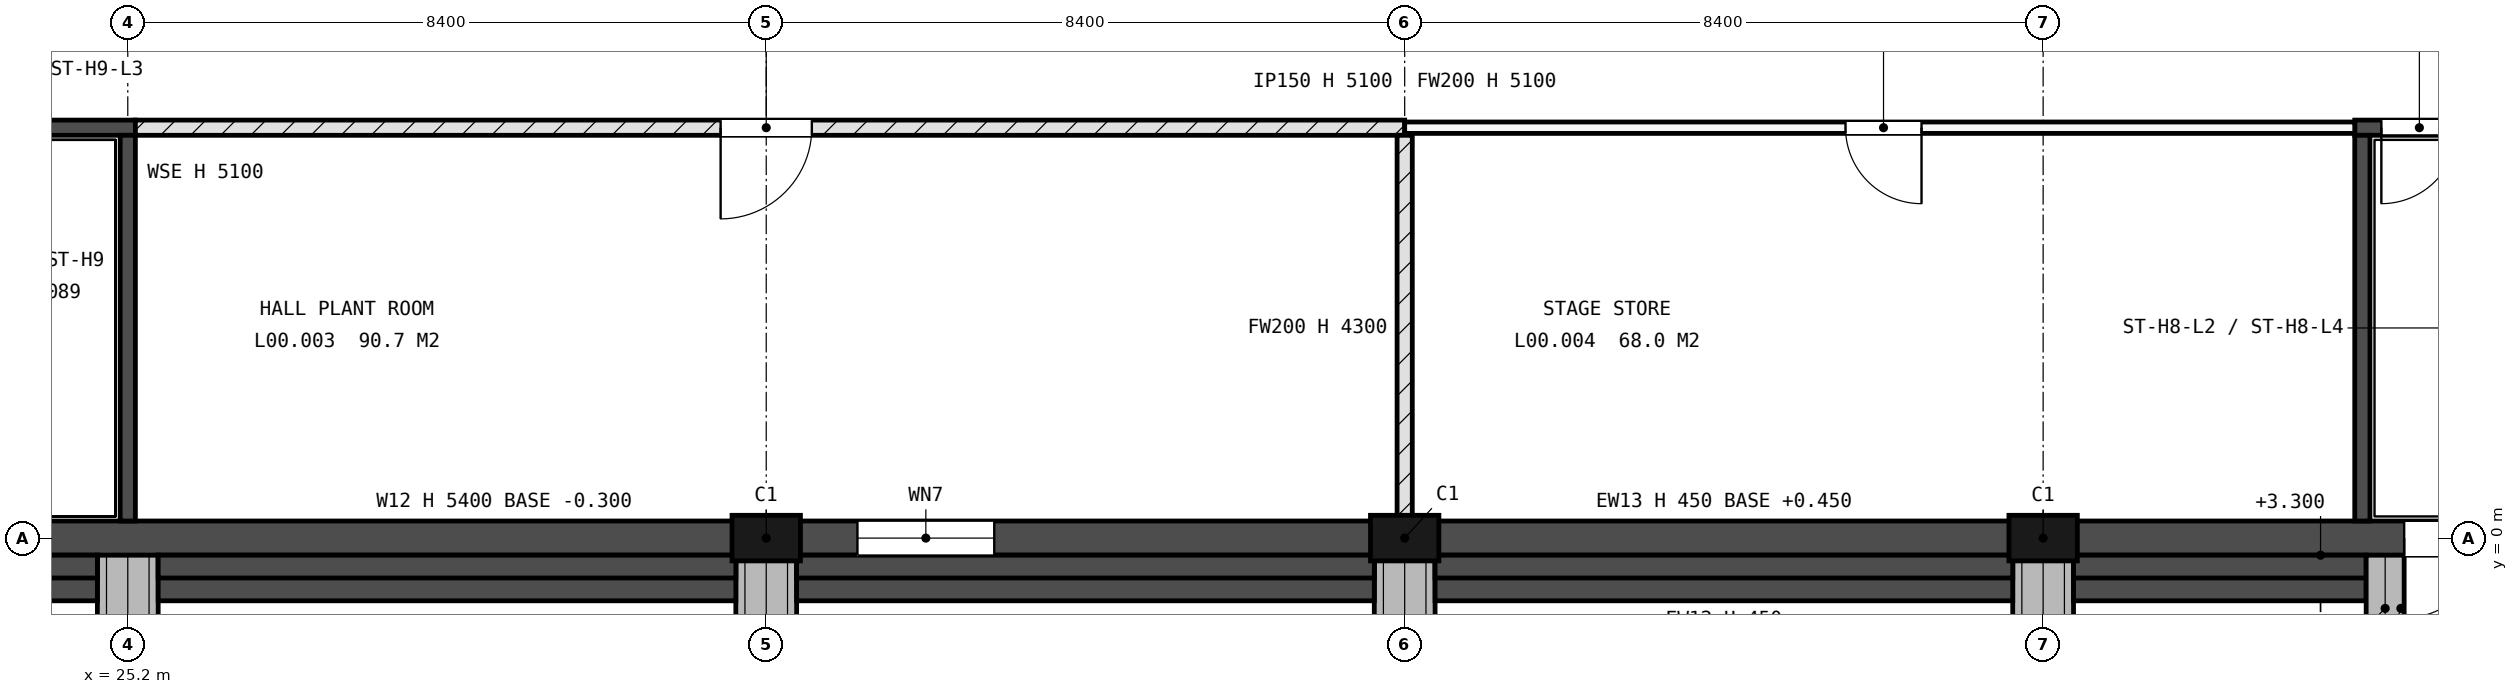
"""IFC4 building model, lengths in metres.
Left out: names, types, materials, properties, quantities, classifications, styles, units other than length and angle.
Written with IfcOpenShell. Run it as: python <this file> out.ifc"""

import sys

from ifc_helpers import new_model, si_unit, direction, frame, frame_2d, origin, origin_2d, place, context, subcontext, project, spatial, rectangle, extrude, element, fill, save


model = new_model("IFC4")
c1 = context("Model", 3, precision=1e-05, world=origin(), true_north=direction((0.0, 1.0)))
c2 = subcontext(c1, "Body", "Model", "MODEL_VIEW")
j1 = project(units=[si_unit("LENGTHUNIT", "METRE"), si_unit("PLANEANGLEUNIT", "RADIAN")], contexts=[c1])
p1 = place(None, origin())
s1 = spatial("IfcSite", under=j1, at=p1, CompositionType="ELEMENT")
p2 = place(p1, origin())
s2 = spatial("IfcBuilding", under=s1, at=p2, CompositionType="ELEMENT")
p3 = place(p2, origin())
s3 = spatial("IfcBuildingStorey", under=s2, at=p3, CompositionType="ELEMENT", Elevation=0.0)
for number, where, z_axis, x_axis in (
    (1, (33.6, 0.0, -0.3), (0.0, 0.0, 1.0), (1.0, 0.0, 0.0)),
    (2, (42.0, 0.0, -0.3), (0.0, 0.0, 1.0), (1.0, 0.0, 0.0)),
    (3, (50.4, 0.0, -0.3), (0.0, 0.0, 1.0), (1.0, 0.0, 0.0)),
):
    element("IfcColumn", number, at=place(p3, frame(where, z_axis=z_axis, x_axis=x_axis)), inside=s3, PredefinedType="PILASTER", context=c2, shape_type="SweptSolid", body=[
        extrude(rectangle(XDim=0.9, YDim=0.6, at=origin_2d()), origin(), (0.0, 0.0, 1.0), 5.4),
    ])
p4 = place(p3, frame((0.0, 0.0, -0.3), z_axis=(0.0, 0.0, 1.0), x_axis=(1.0, 0.0, 0.0)))
e4 = element("IfcWall", 4, at=p4, inside=s3, PredefinedType="SOLIDWALL", context=c2, shape_type="SweptSolid", body=[
    extrude(rectangle(XDim=168.0, YDim=0.45, at=frame_2d((84.0, 0.0))), origin(), (0.0, 0.0, 1.0), 5.4),
])
p5 = place(p4, frame((34.8, 0.0, 2.7)))
e5 = element("IfcOpeningElement", 5, at=p5, cuts=e4, PredefinedType="OPENING", context=c2, shape_type="SweptSolid", body=[
    extrude(rectangle(XDim=1.8, YDim=1.2, at=frame_2d((0.9, 0.6))), frame((0.0, 0.235, 0.0), z_axis=(0.0, -1.0, 0.0), x_axis=(1.0, 0.0, 0.0)), (0.0, 0.0, 1.0), 0.47),
])
p6 = place(p4, frame((69.075, 0.0, 1.5)))
e6 = element("IfcOpeningElement", 6, at=p6, cuts=e4, PredefinedType="OPENING", context=c2, shape_type="SweptSolid", body=[
    extrude(rectangle(XDim=0.45, YDim=2.4, at=frame_2d((0.225, 1.2))), frame((0.0, 0.235, 0.0), z_axis=(0.0, -1.0, 0.0), x_axis=(1.0, 0.0, 0.0)), (0.0, 0.0, 1.0), 0.47),
])
p7 = place(p4, frame((73.275, 0.0, 1.5)))
e7 = element("IfcOpeningElement", 7, at=p7, cuts=e4, PredefinedType="OPENING", context=c2, shape_type="SweptSolid", body=[
    extrude(rectangle(XDim=0.45, YDim=2.4, at=frame_2d((0.225, 1.2))), frame((0.0, 0.235, 0.0), z_axis=(0.0, -1.0, 0.0), x_axis=(1.0, 0.0, 0.0)), (0.0, 0.0, 1.0), 0.47),
])
p8 = place(p4, frame((135.0, 0.0, 2.7)))
e8 = element("IfcOpeningElement", 8, at=p8, cuts=e4, PredefinedType="OPENING", context=c2, shape_type="SweptSolid", body=[
    extrude(rectangle(XDim=1.8, YDim=1.2, at=frame_2d((0.9, 0.6))), frame((0.0, 0.235, 0.0), z_axis=(0.0, -1.0, 0.0), x_axis=(1.0, 0.0, 0.0)), (0.0, 0.0, 1.0), 0.47),
])
p9 = place(p4, frame((144.0, 0.0, 2.7)))
e9 = element("IfcOpeningElement", 9, at=p9, cuts=e4, PredefinedType="OPENING", context=c2, shape_type="SweptSolid", body=[
    extrude(rectangle(XDim=1.8, YDim=1.2, at=frame_2d((0.9, 0.6))), frame((0.0, 0.235, 0.0), z_axis=(0.0, -1.0, 0.0), x_axis=(1.0, 0.0, 0.0)), (0.0, 0.0, 1.0), 0.47),
])
p10 = place(p4, frame((114.6, 0.0, 0.3), z_axis=(0.0, 0.0, 1.0), x_axis=(-1.0, 0.0, 0.0)))
e10 = element("IfcOpeningElement", 10, at=p10, cuts=e4, PredefinedType="OPENING", context=c2, shape_type="SweptSolid", body=[
    extrude(rectangle(XDim=2.1, YDim=2.2, at=frame_2d((1.05, 1.1))), frame((0.0, 0.235, 0.0), z_axis=(0.0, -1.0, 0.0), x_axis=(1.0, 0.0, 0.0)), (0.0, 0.0, 1.0), 0.47),
])
p11 = place(p4, frame((117.3, 0.0, 0.3), z_axis=(0.0, 0.0, 1.0), x_axis=(-1.0, 0.0, 0.0)))
e11 = element("IfcOpeningElement", 11, at=p11, cuts=e4, PredefinedType="OPENING", context=c2, shape_type="SweptSolid", body=[
    extrude(rectangle(XDim=2.1, YDim=2.2, at=frame_2d((1.05, 1.1))), frame((0.0, 0.235, 0.0), z_axis=(0.0, -1.0, 0.0), x_axis=(1.0, 0.0, 0.0)), (0.0, 0.0, 1.0), 0.47),
])
p12 = place(p4, frame((106.05, 0.0, 0.3), z_axis=(0.0, 0.0, 1.0), x_axis=(-1.0, 0.0, 0.0)))
e12 = element("IfcOpeningElement", 12, at=p12, cuts=e4, PredefinedType="OPENING", context=c2, shape_type="SweptSolid", body=[
    extrude(rectangle(XDim=2.1, YDim=2.2, at=frame_2d((1.05, 1.1))), frame((0.0, 0.235, 0.0), z_axis=(0.0, -1.0, 0.0), x_axis=(1.0, 0.0, 0.0)), (0.0, 0.0, 1.0), 0.47),
])
p13 = place(p4, frame((57.25, 0.0, 0.3), z_axis=(0.0, 0.0, 1.0), x_axis=(-1.0, 0.0, 0.0)))
e13 = element("IfcOpeningElement", 13, at=p13, cuts=e4, PredefinedType="OPENING", context=c2, shape_type="SweptSolid", body=[
    extrude(rectangle(XDim=2.1, YDim=2.2, at=frame_2d((1.05, 1.1))), frame((0.0, 0.235, 0.0), z_axis=(0.0, -1.0, 0.0), x_axis=(1.0, 0.0, 0.0)), (0.0, 0.0, 1.0), 0.47),
])
p14 = place(p4, frame((120.75, 0.0, 0.3), z_axis=(0.0, 0.0, 1.0), x_axis=(-1.0, 0.0, 0.0)))
e14 = element("IfcOpeningElement", 14, at=p14, cuts=e4, PredefinedType="OPENING", context=c2, shape_type="SweptSolid", body=[
    extrude(rectangle(XDim=2.1, YDim=2.2, at=frame_2d((1.05, 1.1))), frame((0.0, 0.235, 0.0), z_axis=(0.0, -1.0, 0.0), x_axis=(1.0, 0.0, 0.0)), (0.0, 0.0, 1.0), 0.47),
])
p15 = place(p4, frame((124.95, 0.0, 0.3), z_axis=(0.0, 0.0, 1.0), x_axis=(-1.0, 0.0, 0.0)))
e15 = element("IfcOpeningElement", 15, at=p15, cuts=e4, PredefinedType="OPENING", context=c2, shape_type="SweptSolid", body=[
    extrude(rectangle(XDim=2.1, YDim=2.2, at=frame_2d((1.05, 1.1))), frame((0.0, 0.235, 0.0), z_axis=(0.0, -1.0, 0.0), x_axis=(1.0, 0.0, 0.0)), (0.0, 0.0, 1.0), 0.47),
])
p16 = place(p4, frame((19.45, 0.0, 0.3), z_axis=(0.0, 0.0, 1.0), x_axis=(-1.0, 0.0, 0.0)))
e16 = element("IfcOpeningElement", 16, at=p16, cuts=e4, PredefinedType="OPENING", context=c2, shape_type="SweptSolid", body=[
    extrude(rectangle(XDim=2.1, YDim=2.2, at=frame_2d((1.05, 1.1))), frame((0.0, 0.235, 0.0), z_axis=(0.0, -1.0, 0.0), x_axis=(1.0, 0.0, 0.0)), (0.0, 0.0, 1.0), 0.47),
])
p17 = place(p4, frame((162.25, 0.0, 0.3), z_axis=(0.0, 0.0, 1.0), x_axis=(-1.0, 0.0, 0.0)))
e17 = element("IfcOpeningElement", 17, at=p17, cuts=e4, PredefinedType="OPENING", context=c2, shape_type="SweptSolid", body=[
    extrude(rectangle(XDim=2.1, YDim=2.2, at=frame_2d((1.05, 1.1))), frame((0.0, 0.235, 0.0), z_axis=(0.0, -1.0, 0.0), x_axis=(1.0, 0.0, 0.0)), (0.0, 0.0, 1.0), 0.47),
])
p18 = place(p4, frame((4.8, 0.0, 0.3), z_axis=(0.0, 0.0, 1.0), x_axis=(-1.0, 0.0, 0.0)))
e18 = element("IfcOpeningElement", 18, at=p18, cuts=e4, PredefinedType="OPENING", context=c2, shape_type="SweptSolid", body=[
    extrude(rectangle(XDim=1.2, YDim=2.2, at=frame_2d((0.6, 1.1))), frame((0.0, 0.235, 0.0), z_axis=(0.0, -1.0, 0.0), x_axis=(1.0, 0.0, 0.0)), (0.0, 0.0, 1.0), 0.47),
])
p19 = place(p4, frame((64.8, 0.0, 0.3), z_axis=(0.0, 0.0, 1.0), x_axis=(-1.0, 0.0, 0.0)))
e19 = element("IfcOpeningElement", 19, at=p19, cuts=e4, PredefinedType="OPENING", context=c2, shape_type="SweptSolid", body=[
    extrude(rectangle(XDim=1.2, YDim=2.2, at=frame_2d((0.6, 1.1))), frame((0.0, 0.235, 0.0), z_axis=(0.0, -1.0, 0.0), x_axis=(1.0, 0.0, 0.0)), (0.0, 0.0, 1.0), 0.47),
])
p20 = place(p4, frame((81.0, 0.0, 0.3), z_axis=(0.0, 0.0, 1.0), x_axis=(-1.0, 0.0, 0.0)))
e20 = element("IfcOpeningElement", 20, at=p20, cuts=e4, PredefinedType="OPENING", context=c2, shape_type="SweptSolid", body=[
    extrude(rectangle(XDim=2.4, YDim=2.4, at=frame_2d((1.2, 1.2))), frame((0.0, 0.235, 0.0), z_axis=(0.0, -1.0, 0.0), x_axis=(1.0, 0.0, 0.0)), (0.0, 0.0, 1.0), 0.47),
])
p21 = place(p4, frame((97.8, 0.0, 0.3), z_axis=(0.0, 0.0, 1.0), x_axis=(-1.0, 0.0, 0.0)))
e21 = element("IfcOpeningElement", 21, at=p21, cuts=e4, PredefinedType="OPENING", context=c2, shape_type="SweptSolid", body=[
    extrude(rectangle(XDim=2.4, YDim=2.4, at=frame_2d((1.2, 1.2))), frame((0.0, 0.235, 0.0), z_axis=(0.0, -1.0, 0.0), x_axis=(1.0, 0.0, 0.0)), (0.0, 0.0, 1.0), 0.47),
])
p22 = place(p4, frame((139.8, 0.0, 0.3), z_axis=(0.0, 0.0, 1.0), x_axis=(-1.0, 0.0, 0.0)))
e22 = element("IfcOpeningElement", 22, at=p22, cuts=e4, PredefinedType="OPENING", context=c2, shape_type="SweptSolid", body=[
    extrude(rectangle(XDim=2.4, YDim=2.1, at=frame_2d((1.2, 1.05))), frame((0.0, 0.235, 0.0), z_axis=(0.0, -1.0, 0.0), x_axis=(1.0, 0.0, 0.0)), (0.0, 0.0, 1.0), 0.47),
])
p23 = place(p4, frame((156.3, 0.0, 0.3), z_axis=(0.0, 0.0, 1.0), x_axis=(-1.0, 0.0, 0.0)))
e23 = element("IfcOpeningElement", 23, at=p23, cuts=e4, PredefinedType="OPENING", context=c2, shape_type="SweptSolid", body=[
    extrude(rectangle(XDim=1.8, YDim=2.2, at=frame_2d((0.9, 1.1))), frame((0.0, 0.235, 0.0), z_axis=(0.0, -1.0, 0.0), x_axis=(1.0, 0.0, 0.0)), (0.0, 0.0, 1.0), 0.47),
])
for number, where, z_axis, x_axis in (
    (24, (25.2, -0.225, 0.0), (0.0, 0.0, 1.0), (0.0, -1.0, 0.0)),
    (25, (33.6, -0.225, 0.0), (0.0, 0.0, 1.0), (0.0, -1.0, 0.0)),
    (26, (42.0, -0.225, 0.0), (0.0, 0.0, 1.0), (0.0, -1.0, 0.0)),
    (27, (50.4, -0.225, 0.0), (0.0, 0.0, 1.0), (0.0, -1.0, 0.0)),
):
    element("IfcWall", number, at=place(p3, frame(where, z_axis=z_axis, x_axis=x_axis)), inside=s3, PredefinedType="SOLIDWALL", context=c2, shape_type="SweptSolid", body=[
        extrude(rectangle(XDim=0.9, YDim=0.8, at=frame_2d((0.45, 0.0))), origin(), (0.0, 0.0, 1.0), 5.1),
    ])
p24 = place(p3, frame((19.95, -0.525, 0.0), z_axis=(0.0, 0.0, 1.0), x_axis=(1.0, 0.0, 0.0)))
e28 = element("IfcWall", 28, at=p24, inside=s3, PredefinedType="SOLIDWALL", context=c2, shape_type="SweptSolid", body=[
    extrude(rectangle(XDim=4.85, YDim=0.6, at=frame_2d((2.425, 0.0))), origin(), (0.0, 0.0, 1.0), 0.45),
])
p25 = place(p3, frame((19.95, -0.375, 0.45), z_axis=(0.0, 0.0, 1.0), x_axis=(1.0, 0.0, 0.0)))
e29 = element("IfcWall", 29, at=p25, inside=s3, PredefinedType="SOLIDWALL", context=c2, shape_type="SweptSolid", body=[
    extrude(rectangle(XDim=4.85, YDim=0.3, at=frame_2d((2.425, 0.0))), origin(), (0.0, 0.0, 1.0), 0.45),
])
p26 = place(p3, frame((25.6, -0.525, 0.0), z_axis=(0.0, 0.0, 1.0), x_axis=(1.0, 0.0, 0.0)))
e30 = element("IfcWall", 30, at=p26, inside=s3, PredefinedType="SOLIDWALL", context=c2, shape_type="SweptSolid", body=[
    extrude(rectangle(XDim=7.6, YDim=0.6, at=frame_2d((3.8, 0.0))), origin(), (0.0, 0.0, 1.0), 0.45),
])
p27 = place(p3, frame((25.6, -0.375, 0.45), z_axis=(0.0, 0.0, 1.0), x_axis=(1.0, 0.0, 0.0)))
e31 = element("IfcWall", 31, at=p27, inside=s3, PredefinedType="SOLIDWALL", context=c2, shape_type="SweptSolid", body=[
    extrude(rectangle(XDim=7.6, YDim=0.3, at=frame_2d((3.8, 0.0))), origin(), (0.0, 0.0, 1.0), 0.45),
])
p28 = place(p3, frame((34.0, -0.525, 0.0), z_axis=(0.0, 0.0, 1.0), x_axis=(1.0, 0.0, 0.0)))
e32 = element("IfcWall", 32, at=p28, inside=s3, PredefinedType="SOLIDWALL", context=c2, shape_type="SweptSolid", body=[
    extrude(rectangle(XDim=7.6, YDim=0.6, at=frame_2d((3.8, 0.0))), origin(), (0.0, 0.0, 1.0), 0.45),
])
p29 = place(p3, frame((34.0, -0.375, 0.45), z_axis=(0.0, 0.0, 1.0), x_axis=(1.0, 0.0, 0.0)))
e33 = element("IfcWall", 33, at=p29, inside=s3, PredefinedType="SOLIDWALL", context=c2, shape_type="SweptSolid", body=[
    extrude(rectangle(XDim=7.6, YDim=0.3, at=frame_2d((3.8, 0.0))), origin(), (0.0, 0.0, 1.0), 0.45),
])
p30 = place(p3, frame((42.4, -0.525, 0.0), z_axis=(0.0, 0.0, 1.0), x_axis=(1.0, 0.0, 0.0)))
e34 = element("IfcWall", 34, at=p30, inside=s3, PredefinedType="SOLIDWALL", context=c2, shape_type="SweptSolid", body=[
    extrude(rectangle(XDim=7.6, YDim=0.6, at=frame_2d((3.8, 0.0))), origin(), (0.0, 0.0, 1.0), 0.45),
])
p31 = place(p3, frame((42.4, -0.375, 0.45), z_axis=(0.0, 0.0, 1.0), x_axis=(1.0, 0.0, 0.0)))
e35 = element("IfcWall", 35, at=p31, inside=s3, PredefinedType="SOLIDWALL", context=c2, shape_type="SweptSolid", body=[
    extrude(rectangle(XDim=7.6, YDim=0.3, at=frame_2d((3.8, 0.0))), origin(), (0.0, 0.0, 1.0), 0.45),
])
p32 = place(p3, frame((50.8, -0.525, 0.0), z_axis=(0.0, 0.0, 1.0), x_axis=(1.0, 0.0, 0.0)))
e36 = element("IfcWall", 36, at=p32, inside=s3, PredefinedType="SOLIDWALL", context=c2, shape_type="SweptSolid", body=[
    extrude(rectangle(XDim=3.85, YDim=0.6, at=frame_2d((1.925, 0.0))), origin(), (0.0, 0.0, 1.0), 0.45),
])
p33 = place(p3, frame((50.8, -0.375, 0.45), z_axis=(0.0, 0.0, 1.0), x_axis=(1.0, 0.0, 0.0)))
e37 = element("IfcWall", 37, at=p33, inside=s3, PredefinedType="SOLIDWALL", context=c2, shape_type="SweptSolid", body=[
    extrude(rectangle(XDim=3.85, YDim=0.3, at=frame_2d((1.925, 0.0))), origin(), (0.0, 0.0, 1.0), 0.45),
])
p34 = place(p3, frame((54.9, -0.225, 0.0), z_axis=(0.0, 0.0, 1.0), x_axis=(0.0, -1.0, 0.0)))
e38 = element("IfcWall", 38, at=p34, inside=s3, PredefinedType="SOLIDWALL", context=c2, shape_type="SweptSolid", body=[
    extrude(rectangle(XDim=1.4, YDim=0.5, at=frame_2d((0.7, 0.0))), origin(), (0.0, 0.0, 1.0), 3.08),
])
p35 = place(p3, frame((54.5, 5.4, 0.0), z_axis=(0.0, 0.0, 1.0), x_axis=(1.0, 0.0, 0.0)))
e39 = element("IfcWall", 39, at=p35, inside=s3, PredefinedType="SHEAR", context=c2, shape_type="SweptSolid", body=[
    extrude(rectangle(XDim=8.6, YDim=0.2, at=frame_2d((4.3, 0.0))), origin(), (0.0, 0.0, 1.0), 5.1),
])
p36 = place(p35, frame((0.35, 0.0, 0.0)))
e40 = element("IfcOpeningElement", 40, at=p36, cuts=e39, PredefinedType="OPENING", context=c2, shape_type="SweptSolid", body=[
    extrude(rectangle(XDim=1.0, YDim=2.1, at=frame_2d((0.5, 1.05))), frame((0.0, 0.11, 0.0), z_axis=(0.0, -1.0, 0.0), x_axis=(1.0, 0.0, 0.0)), (0.0, 0.0, 1.0), 0.22),
])
p37 = place(p3, frame((54.6, 0.225, 0.0), z_axis=(0.0, 0.0, 1.0), x_axis=(0.0, 1.0, 0.0)))
e41 = element("IfcWall", 41, at=p37, inside=s3, PredefinedType="SHEAR", context=c2, shape_type="SweptSolid", body=[
    extrude(rectangle(XDim=5.075, YDim=0.2, at=frame_2d((2.538, 0.0))), origin(), (0.0, 0.0, 1.0), 5.1),
])
p38 = place(p3, frame((16.7, 5.4, 0.0), z_axis=(0.0, 0.0, 1.0), x_axis=(1.0, 0.0, 0.0)))
e42 = element("IfcWall", 42, at=p38, inside=s3, PredefinedType="SHEAR", context=c2, shape_type="SweptSolid", body=[
    extrude(rectangle(XDim=8.6, YDim=0.2, at=frame_2d((4.3, 0.0))), origin(), (0.0, 0.0, 1.0), 5.1),
])
p39 = place(p38, frame((0.35, 0.0, 0.0)))
e43 = element("IfcOpeningElement", 43, at=p39, cuts=e42, PredefinedType="OPENING", context=c2, shape_type="SweptSolid", body=[
    extrude(rectangle(XDim=1.0, YDim=2.1, at=frame_2d((0.5, 1.05))), frame((0.0, 0.11, 0.0), z_axis=(0.0, -1.0, 0.0), x_axis=(1.0, 0.0, 0.0)), (0.0, 0.0, 1.0), 0.22),
])
p40 = place(p3, frame((25.2, 0.225, 0.0), z_axis=(0.0, 0.0, 1.0), x_axis=(0.0, 1.0, 0.0)))
e44 = element("IfcWall", 44, at=p40, inside=s3, PredefinedType="SHEAR", context=c2, shape_type="SweptSolid", body=[
    extrude(rectangle(XDim=5.075, YDim=0.2, at=frame_2d((2.538, 0.0))), origin(), (0.0, 0.0, 1.0), 5.1),
])
p41 = place(p3, frame((25.3, 5.4, 0.0), z_axis=(0.0, 0.0, 1.0), x_axis=(1.0, 0.0, 0.0)))
e45 = element("IfcWall", 45, at=p41, inside=s3, PredefinedType="SOLIDWALL", context=c2, shape_type="SweptSolid", body=[
    extrude(rectangle(XDim=16.7, YDim=0.2, at=frame_2d((8.35, 0.0))), origin(), (0.0, 0.0, 1.0), 5.1),
])
p42 = place(p41, frame((7.7, 0.0, 0.0)))
e46 = element("IfcOpeningElement", 46, at=p42, cuts=e45, PredefinedType="OPENING", context=c2, shape_type="SweptSolid", body=[
    extrude(rectangle(XDim=1.2, YDim=2.4, at=frame_2d((0.6, 1.2))), frame((0.0, 0.11, 0.0), z_axis=(0.0, -1.0, 0.0), x_axis=(1.0, 0.0, 0.0)), (0.0, 0.0, 1.0), 0.22),
])
p43 = place(p3, frame((42.0, 5.4, 0.0), z_axis=(0.0, 0.0, 1.0), x_axis=(1.0, 0.0, 0.0)))
e47 = element("IfcWall", 47, at=p43, inside=s3, PredefinedType="PARTITIONING", context=c2, shape_type="SweptSolid", body=[
    extrude(rectangle(XDim=12.5, YDim=0.15, at=frame_2d((6.25, 0.0))), origin(), (0.0, 0.0, 1.0), 5.1),
])
p44 = place(p43, frame((5.8, 0.0, 0.0)))
e48 = element("IfcOpeningElement", 48, at=p44, cuts=e47, PredefinedType="OPENING", context=c2, shape_type="SweptSolid", body=[
    extrude(rectangle(XDim=1.0, YDim=2.1, at=frame_2d((0.5, 1.05))), frame((0.0, 0.085, 0.0), z_axis=(0.0, -1.0, 0.0), x_axis=(1.0, 0.0, 0.0)), (0.0, 0.0, 1.0), 0.17),
])
p45 = place(p3, frame((42.0, 0.225, 0.0), z_axis=(0.0, 0.0, 1.0), x_axis=(0.0, 1.0, 0.0)))
e49 = element("IfcWall", 49, at=p45, inside=s3, PredefinedType="SOLIDWALL", context=c2, shape_type="SweptSolid", body=[
    extrude(rectangle(XDim=5.075, YDim=0.2, at=frame_2d((2.538, 0.0))), origin(), (0.0, 0.0, 1.0), 4.3),
])
p46 = place(p5, origin())
e50 = element("IfcWindow", 50, at=p46, inside=s3, PartitioningType="SINGLE_PANEL", PredefinedType="WINDOW", context=c2, shape_type="SweptSolid", body=[
    extrude(rectangle(XDim=1.8, YDim=1.2, at=frame_2d((0.9, 0.6))), frame((0.0, 0.03, 0.0), z_axis=(0.0, -1.0, 0.0), x_axis=(1.0, 0.0, 0.0)), (0.0, 0.0, 1.0), 0.06),
])
fill(e5, e50)
p47 = place(p13, origin())
e51 = element("IfcDoor", 51, at=p47, inside=s3, OperationType="SINGLE_SWING_LEFT", PredefinedType="DOOR", context=c2, shape_type="SweptSolid", body=[
    extrude(rectangle(XDim=2.1, YDim=0.013, at=frame_2d((1.05, 0.007))), frame((0.0, 0.115, 0.0), z_axis=(0.0, -1.0, 0.0), x_axis=(1.0, 0.0, 0.0)), (0.0, 0.0, 1.0), 0.23),
    extrude(rectangle(XDim=0.075, YDim=2.112, at=frame_2d((0.038, 1.069))), frame((0.0, 0.125, 0.0), z_axis=(0.0, -1.0, 0.0), x_axis=(1.0, 0.0, 0.0)), (0.0, 0.0, 1.0), 0.25),
    extrude(rectangle(XDim=0.075, YDim=2.112, at=frame_2d((2.062, 1.069))), frame((0.0, 0.125, 0.0), z_axis=(0.0, -1.0, 0.0), x_axis=(1.0, 0.0, 0.0)), (0.0, 0.0, 1.0), 0.25),
    extrude(rectangle(XDim=2.1, YDim=0.075, at=frame_2d((1.05, 2.163))), frame((0.0, 0.115, 0.0), z_axis=(0.0, -1.0, 0.0), x_axis=(1.0, 0.0, 0.0)), (0.0, 0.0, 1.0), 0.23),
    extrude(rectangle(XDim=1.95, YDim=2.112, at=frame_2d((1.05, 1.069))), frame((0.0, 0.025, 0.0), z_axis=(0.0, -1.0, 0.0), x_axis=(1.0, 0.0, 0.0)), (0.0, 0.0, 1.0), 0.05),
])
fill(e13, e51)
p48 = place(p36, origin())
e52 = element("IfcDoor", 52, at=p48, inside=s3, OperationType="SINGLE_SWING_LEFT", PredefinedType="DOOR", context=c2, shape_type="SweptSolid", body=[
    extrude(rectangle(XDim=1.0, YDim=2.1, at=frame_2d((0.5, 1.05))), frame((0.0, 0.025, 0.0), z_axis=(0.0, -1.0, 0.0), x_axis=(1.0, 0.0, 0.0)), (0.0, 0.0, 1.0), 0.05),
])
fill(e40, e52)
p49 = place(p42, origin())
e53 = element("IfcDoor", 53, at=p49, inside=s3, OperationType="SINGLE_SWING_LEFT", PredefinedType="DOOR", context=c2, shape_type="SweptSolid", body=[
    extrude(rectangle(XDim=1.2, YDim=2.4, at=frame_2d((0.6, 1.2))), frame((0.0, 0.025, 0.0), z_axis=(0.0, -1.0, 0.0), x_axis=(1.0, 0.0, 0.0)), (0.0, 0.0, 1.0), 0.05),
])
fill(e46, e53)
p50 = place(p44, origin())
e54 = element("IfcDoor", 54, at=p50, inside=s3, OperationType="SINGLE_SWING_RIGHT", PredefinedType="DOOR", context=c2, shape_type="SweptSolid", body=[
    extrude(rectangle(XDim=1.0, YDim=2.1, at=frame_2d((0.5, 1.05))), frame((0.0, 0.025, 0.0), z_axis=(0.0, -1.0, 0.0), x_axis=(1.0, 0.0, 0.0)), (0.0, 0.0, 1.0), 0.05),
])
fill(e48, e54)
save(model, sys.argv[1])
